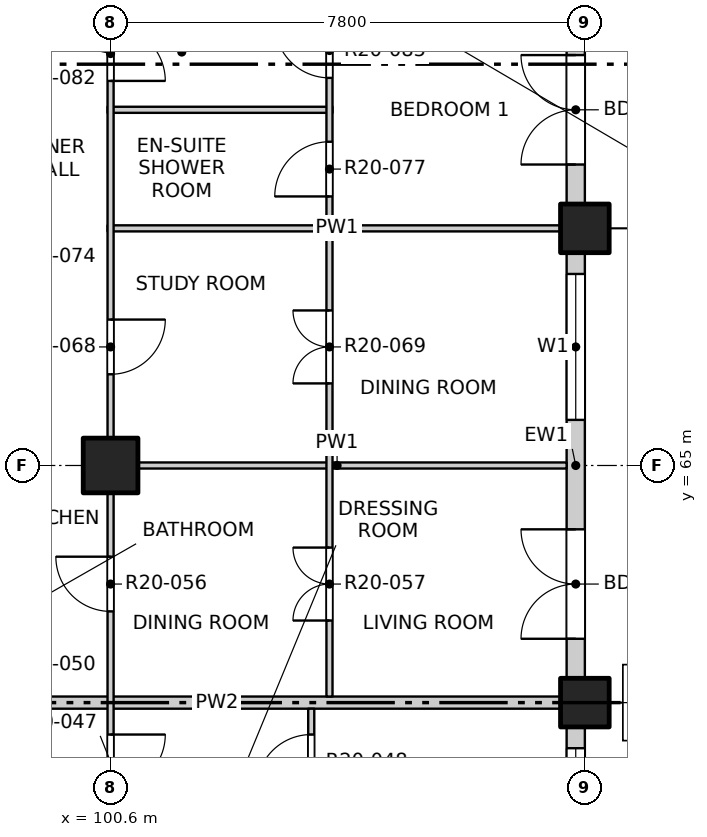
"""IFC4 building model, lengths in metres.
Left out: names, types, materials, properties, quantities, classifications, styles, units other than length and angle.
Written with IfcOpenShell. Run it as: python <this file> out.ifc"""

import sys

from ifc_helpers import new_model, si_unit, direction, frame, frame_2d, origin, origin_2d, place, context, subcontext, project, spatial, rectangle, extrude, element, fill, save


model = new_model("IFC4")
c1 = context("Model", 3, precision=1e-05, world=origin(), true_north=direction((0.0, 1.0)))
c2 = subcontext(c1, "Body", "Model", "MODEL_VIEW")
j1 = project(units=[si_unit("LENGTHUNIT", "METRE"), si_unit("PLANEANGLEUNIT", "RADIAN")], contexts=[c1])
p1 = place(None, origin())
s1 = spatial("IfcSite", under=j1, at=p1, CompositionType="ELEMENT")
p2 = place(p1, origin())
s2 = spatial("IfcBuilding", under=s1, at=p2, CompositionType="ELEMENT")
p3 = place(p2, frame((0.0, 0.0, 204.1)))
s3 = spatial("IfcBuildingStorey", under=s2, at=p3, CompositionType="ELEMENT", Elevation=204.1)
for number, where, z_axis, x_axis in (
    (1, (108.4, 61.1, -0.25), (0.0, 0.0, 1.0), (1.0, 0.0, 0.0)),
    (2, (108.4, 68.9, -0.25), (0.0, 0.0, 1.0), (1.0, 0.0, 0.0)),
):
    element("IfcColumn", number, at=place(p3, frame(where, z_axis=z_axis, x_axis=x_axis)), inside=s3, PredefinedType="COLUMN", context=c2, shape_type="SweptSolid", body=[
        extrude(rectangle(XDim=0.8, YDim=0.8, at=origin_2d()), origin(), (0.0, 0.0, 1.0), 3.4),
    ])
p4 = place(p3, frame((100.6, 65.0, -0.25), z_axis=(0.0, 0.0, 1.0), x_axis=(1.0, 0.0, 0.0)))
e3 = element("IfcColumn", 3, at=p4, inside=s3, PredefinedType="COLUMN", context=c2, shape_type="SweptSolid", body=[
    extrude(rectangle(XDim=0.9, YDim=0.9, at=origin_2d()), origin(), (0.0, 0.0, 1.0), 3.4),
])
p5 = place(p3, frame((108.25, 53.7, 0.0), z_axis=(0.0, 0.0, 1.0), x_axis=(0.0, 1.0, 0.0)))
e4 = element("IfcWall", 4, at=p5, inside=s3, PredefinedType="SOLIDWALL", context=c2, shape_type="SweptSolid", body=[
    extrude(rectangle(XDim=7.0, YDim=0.3, at=frame_2d((3.5, 0.0))), origin(), (0.0, 0.0, 1.0), 2.7),
])
p6 = place(p5, frame((0.65, 0.0, 0.0)))
e5 = element("IfcOpeningElement", 5, at=p6, cuts=e4, PredefinedType="OPENING", context=c2, shape_type="SweptSolid", body=[
    extrude(rectangle(XDim=1.8, YDim=2.4, at=frame_2d((0.9, 1.2))), frame((0.0, 0.16, 0.0), z_axis=(0.0, -1.0, 0.0), x_axis=(1.0, 0.0, 0.0)), (0.0, 0.0, 1.0), 0.32),
])
p7 = place(p5, frame((4.25, 0.0, 0.9)))
e6 = element("IfcOpeningElement", 6, at=p7, cuts=e4, PredefinedType="OPENING", context=c2, shape_type="SweptSolid", body=[
    extrude(rectangle(XDim=2.4, YDim=1.8, at=frame_2d((1.2, 0.9))), frame((0.0, 0.16, 0.0), z_axis=(0.0, -1.0, 0.0), x_axis=(1.0, 0.0, 0.0)), (0.0, 0.0, 1.0), 0.32),
])
p8 = place(p3, frame((108.25, 61.5, 0.0), z_axis=(0.0, 0.0, 1.0), x_axis=(0.0, 1.0, 0.0)))
e7 = element("IfcWall", 7, at=p8, inside=s3, PredefinedType="SOLIDWALL", context=c2, shape_type="SweptSolid", body=[
    extrude(rectangle(XDim=7.0, YDim=0.3, at=frame_2d((3.5, 0.0))), origin(), (0.0, 0.0, 1.0), 2.7),
])
p9 = place(p8, frame((0.65, 0.0, 0.0)))
e8 = element("IfcOpeningElement", 8, at=p9, cuts=e7, PredefinedType="OPENING", context=c2, shape_type="SweptSolid", body=[
    extrude(rectangle(XDim=1.8, YDim=2.4, at=frame_2d((0.9, 1.2))), frame((0.0, 0.16, 0.0), z_axis=(0.0, -1.0, 0.0), x_axis=(1.0, 0.0, 0.0)), (0.0, 0.0, 1.0), 0.32),
])
p10 = place(p8, frame((4.25, 0.0, 0.9)))
e9 = element("IfcOpeningElement", 9, at=p10, cuts=e7, PredefinedType="OPENING", context=c2, shape_type="SweptSolid", body=[
    extrude(rectangle(XDim=2.4, YDim=1.8, at=frame_2d((1.2, 0.9))), frame((0.0, 0.16, 0.0), z_axis=(0.0, -1.0, 0.0), x_axis=(1.0, 0.0, 0.0)), (0.0, 0.0, 1.0), 0.32),
])
p11 = place(p3, frame((108.25, 69.3, 0.0), z_axis=(0.0, 0.0, 1.0), x_axis=(0.0, 1.0, 0.0)))
e10 = element("IfcWall", 10, at=p11, inside=s3, PredefinedType="SOLIDWALL", context=c2, shape_type="SweptSolid", body=[
    extrude(rectangle(XDim=7.0, YDim=0.3, at=frame_2d((3.5, 0.0))), origin(), (0.0, 0.0, 1.0), 2.7),
])
p12 = place(p11, frame((0.65, 0.0, 0.0)))
e11 = element("IfcOpeningElement", 11, at=p12, cuts=e10, PredefinedType="OPENING", context=c2, shape_type="SweptSolid", body=[
    extrude(rectangle(XDim=1.8, YDim=2.4, at=frame_2d((0.9, 1.2))), frame((0.0, 0.16, 0.0), z_axis=(0.0, -1.0, 0.0), x_axis=(1.0, 0.0, 0.0)), (0.0, 0.0, 1.0), 0.32),
])
p13 = place(p11, frame((4.25, 0.0, 0.9)))
e12 = element("IfcOpeningElement", 12, at=p13, cuts=e10, PredefinedType="OPENING", context=c2, shape_type="SweptSolid", body=[
    extrude(rectangle(XDim=2.4, YDim=1.8, at=frame_2d((1.2, 0.9))), frame((0.0, 0.16, 0.0), z_axis=(0.0, -1.0, 0.0), x_axis=(1.0, 0.0, 0.0)), (0.0, 0.0, 1.0), 0.32),
])
p14 = place(p3, frame((96.6, 61.1, 0.0), z_axis=(0.0, 0.0, 1.0), x_axis=(1.0, 0.0, 0.0)))
e13 = element("IfcWall", 13, at=p14, inside=s3, PredefinedType="PARTITIONING", context=c2, shape_type="SweptSolid", body=[
    extrude(rectangle(XDim=11.5, YDim=0.2, at=frame_2d((5.75, 0.0))), origin(), (0.0, 0.0, 1.0), 2.55),
])
p15 = place(p3, frame((100.55, 65.0, 0.0), z_axis=(0.0, 0.0, 1.0), x_axis=(1.0, 0.0, 0.0)))
e14 = element("IfcWall", 14, at=p15, inside=s3, PredefinedType="PARTITIONING", context=c2, shape_type="SweptSolid", body=[
    extrude(rectangle(XDim=7.55, YDim=0.1, at=frame_2d((3.775, 0.0))), origin(), (0.0, 0.0, 1.0), 3.15),
])
p16 = place(p3, frame((100.55, 68.9, 0.0), z_axis=(0.0, 0.0, 1.0), x_axis=(1.0, 0.0, 0.0)))
e15 = element("IfcWall", 15, at=p16, inside=s3, PredefinedType="PARTITIONING", context=c2, shape_type="SweptSolid", body=[
    extrude(rectangle(XDim=7.55, YDim=0.1, at=frame_2d((3.775, 0.0))), origin(), (0.0, 0.0, 1.0), 2.55),
])
p17 = place(p3, frame((100.55, 70.85, 0.0), z_axis=(0.0, 0.0, 1.0), x_axis=(1.0, 0.0, 0.0)))
e16 = element("IfcWall", 16, at=p17, inside=s3, PredefinedType="PARTITIONING", context=c2, shape_type="SweptSolid", body=[
    extrude(rectangle(XDim=3.7, YDim=0.1, at=frame_2d((1.85, 0.0))), origin(), (0.0, 0.0, 1.0), 3.15),
])
p18 = place(p3, frame((100.6, 41.9, 0.0), z_axis=(0.0, 0.0, 1.0), x_axis=(0.0, 1.0, 0.0)))
e17 = element("IfcWall", 17, at=p18, inside=s3, PredefinedType="PARTITIONING", context=c2, shape_type="SweptSolid", body=[
    extrude(rectangle(XDim=46.2, YDim=0.1, at=frame_2d((23.1, 0.0))), origin(), (0.0, 0.0, 1.0), 3.15),
])
p19 = place(p18, frame((1.2, 0.0, 0.0)))
e18 = element("IfcOpeningElement", 18, at=p19, cuts=e17, PredefinedType="OPENING", context=c2, shape_type="SweptSolid", body=[
    extrude(rectangle(XDim=0.9, YDim=2.1, at=frame_2d((0.45, 1.05))), frame((0.0, 0.06, 0.0), z_axis=(0.0, -1.0, 0.0), x_axis=(1.0, 0.0, 0.0)), (0.0, 0.0, 1.0), 0.12),
])
p20 = place(p18, frame((6.025, 0.0, 0.0)))
e19 = element("IfcOpeningElement", 19, at=p20, cuts=e17, PredefinedType="OPENING", context=c2, shape_type="SweptSolid", body=[
    extrude(rectangle(XDim=0.9, YDim=2.1, at=frame_2d((0.45, 1.05))), frame((0.0, 0.06, 0.0), z_axis=(0.0, -1.0, 0.0), x_axis=(1.0, 0.0, 0.0)), (0.0, 0.0, 1.0), 0.12),
])
p21 = place(p18, frame((9.0, 0.0, 0.0)))
e20 = element("IfcOpeningElement", 20, at=p21, cuts=e17, PredefinedType="OPENING", context=c2, shape_type="SweptSolid", body=[
    extrude(rectangle(XDim=0.9, YDim=2.1, at=frame_2d((0.45, 1.05))), frame((0.0, 0.06, 0.0), z_axis=(0.0, -1.0, 0.0), x_axis=(1.0, 0.0, 0.0)), (0.0, 0.0, 1.0), 0.12),
])
p22 = place(p18, frame((13.85, 0.0, 0.0)))
e21 = element("IfcOpeningElement", 21, at=p22, cuts=e17, PredefinedType="OPENING", context=c2, shape_type="SweptSolid", body=[
    extrude(rectangle(XDim=0.9, YDim=2.1, at=frame_2d((0.45, 1.05))), frame((0.0, 0.06, 0.0), z_axis=(0.0, -1.0, 0.0), x_axis=(1.0, 0.0, 0.0)), (0.0, 0.0, 1.0), 0.12),
])
p23 = place(p18, frame((17.775, 0.0, 0.0)))
e22 = element("IfcOpeningElement", 22, at=p23, cuts=e17, PredefinedType="OPENING", context=c2, shape_type="SweptSolid", body=[
    extrude(rectangle(XDim=0.9, YDim=2.1, at=frame_2d((0.45, 1.05))), frame((0.0, 0.06, 0.0), z_axis=(0.0, -1.0, 0.0), x_axis=(1.0, 0.0, 0.0)), (0.0, 0.0, 1.0), 0.12),
])
p24 = place(p18, frame((20.7, 0.0, 0.0)))
e23 = element("IfcOpeningElement", 23, at=p24, cuts=e17, PredefinedType="OPENING", context=c2, shape_type="SweptSolid", body=[
    extrude(rectangle(XDim=0.9, YDim=2.1, at=frame_2d((0.45, 1.05))), frame((0.0, 0.06, 0.0), z_axis=(0.0, -1.0, 0.0), x_axis=(1.0, 0.0, 0.0)), (0.0, 0.0, 1.0), 0.12),
])
p25 = place(p18, frame((24.6, 0.0, 0.0)))
e24 = element("IfcOpeningElement", 24, at=p25, cuts=e17, PredefinedType="OPENING", context=c2, shape_type="SweptSolid", body=[
    extrude(rectangle(XDim=0.9, YDim=2.1, at=frame_2d((0.45, 1.05))), frame((0.0, 0.06, 0.0), z_axis=(0.0, -1.0, 0.0), x_axis=(1.0, 0.0, 0.0)), (0.0, 0.0, 1.0), 0.12),
])
p26 = place(p18, frame((29.425, 0.0, 0.0)))
e25 = element("IfcOpeningElement", 25, at=p26, cuts=e17, PredefinedType="OPENING", context=c2, shape_type="SweptSolid", body=[
    extrude(rectangle(XDim=0.9, YDim=2.1, at=frame_2d((0.45, 1.05))), frame((0.0, 0.06, 0.0), z_axis=(0.0, -1.0, 0.0), x_axis=(1.0, 0.0, 0.0)), (0.0, 0.0, 1.0), 0.12),
])
p27 = place(p18, frame((33.375, 0.0, 0.0)))
e26 = element("IfcOpeningElement", 26, at=p27, cuts=e17, PredefinedType="OPENING", context=c2, shape_type="SweptSolid", body=[
    extrude(rectangle(XDim=0.9, YDim=2.1, at=frame_2d((0.45, 1.05))), frame((0.0, 0.06, 0.0), z_axis=(0.0, -1.0, 0.0), x_axis=(1.0, 0.0, 0.0)), (0.0, 0.0, 1.0), 0.12),
])
p28 = place(p18, frame((36.3, 0.0, 0.0)))
e27 = element("IfcOpeningElement", 27, at=p28, cuts=e17, PredefinedType="OPENING", context=c2, shape_type="SweptSolid", body=[
    extrude(rectangle(XDim=0.9, YDim=2.1, at=frame_2d((0.45, 1.05))), frame((0.0, 0.06, 0.0), z_axis=(0.0, -1.0, 0.0), x_axis=(1.0, 0.0, 0.0)), (0.0, 0.0, 1.0), 0.12),
])
p29 = place(p18, frame((41.175, 0.0, 0.0)))
e28 = element("IfcOpeningElement", 28, at=p29, cuts=e17, PredefinedType="OPENING", context=c2, shape_type="SweptSolid", body=[
    extrude(rectangle(XDim=0.9, YDim=2.1, at=frame_2d((0.45, 1.05))), frame((0.0, 0.06, 0.0), z_axis=(0.0, -1.0, 0.0), x_axis=(1.0, 0.0, 0.0)), (0.0, 0.0, 1.0), 0.12),
])
p30 = place(p18, frame((44.1, 0.0, 0.0)))
e29 = element("IfcOpeningElement", 29, at=p30, cuts=e17, PredefinedType="OPENING", context=c2, shape_type="SweptSolid", body=[
    extrude(rectangle(XDim=0.9, YDim=2.1, at=frame_2d((0.45, 1.05))), frame((0.0, 0.06, 0.0), z_axis=(0.0, -1.0, 0.0), x_axis=(1.0, 0.0, 0.0)), (0.0, 0.0, 1.0), 0.12),
])
p31 = place(p3, frame((103.9, 41.9, 0.0), z_axis=(0.0, 0.0, 1.0), x_axis=(0.0, 1.0, 0.0)))
e30 = element("IfcWall", 30, at=p31, inside=s3, PredefinedType="PARTITIONING", context=c2, shape_type="SweptSolid", body=[
    extrude(rectangle(XDim=19.1, YDim=0.1, at=frame_2d((9.55, 0.0))), origin(), (0.0, 0.0, 1.0), 3.15),
])
p32 = place(p31, frame((1.05, 0.0, 0.0)))
e31 = element("IfcOpeningElement", 31, at=p32, cuts=e30, PredefinedType="OPENING", context=c2, shape_type="SweptSolid", body=[
    extrude(rectangle(XDim=1.2, YDim=2.1, at=frame_2d((0.6, 1.05))), frame((0.0, 0.06, 0.0), z_axis=(0.0, -1.0, 0.0), x_axis=(1.0, 0.0, 0.0)), (0.0, 0.0, 1.0), 0.12),
])
p33 = place(p31, frame((4.125, 0.0, 0.0)))
e32 = element("IfcOpeningElement", 32, at=p33, cuts=e30, PredefinedType="OPENING", context=c2, shape_type="SweptSolid", body=[
    extrude(rectangle(XDim=0.9, YDim=2.1, at=frame_2d((0.45, 1.05))), frame((0.0, 0.06, 0.0), z_axis=(0.0, -1.0, 0.0), x_axis=(1.0, 0.0, 0.0)), (0.0, 0.0, 1.0), 0.12),
])
p34 = place(p31, frame((6.075, 0.0, 0.0)))
e33 = element("IfcOpeningElement", 33, at=p34, cuts=e30, PredefinedType="OPENING", context=c2, shape_type="SweptSolid", body=[
    extrude(rectangle(XDim=0.9, YDim=2.1, at=frame_2d((0.45, 1.05))), frame((0.0, 0.06, 0.0), z_axis=(0.0, -1.0, 0.0), x_axis=(1.0, 0.0, 0.0)), (0.0, 0.0, 1.0), 0.12),
])
p35 = place(p31, frame((8.85, 0.0, 0.0)))
e34 = element("IfcOpeningElement", 34, at=p35, cuts=e30, PredefinedType="OPENING", context=c2, shape_type="SweptSolid", body=[
    extrude(rectangle(XDim=1.2, YDim=2.1, at=frame_2d((0.6, 1.05))), frame((0.0, 0.06, 0.0), z_axis=(0.0, -1.0, 0.0), x_axis=(1.0, 0.0, 0.0)), (0.0, 0.0, 1.0), 0.12),
])
p36 = place(p31, frame((11.925, 0.0, 0.0)))
e35 = element("IfcOpeningElement", 35, at=p36, cuts=e30, PredefinedType="OPENING", context=c2, shape_type="SweptSolid", body=[
    extrude(rectangle(XDim=0.9, YDim=2.1, at=frame_2d((0.45, 1.05))), frame((0.0, 0.06, 0.0), z_axis=(0.0, -1.0, 0.0), x_axis=(1.0, 0.0, 0.0)), (0.0, 0.0, 1.0), 0.12),
])
p37 = place(p31, frame((13.875, 0.0, 0.0)))
e36 = element("IfcOpeningElement", 36, at=p37, cuts=e30, PredefinedType="OPENING", context=c2, shape_type="SweptSolid", body=[
    extrude(rectangle(XDim=0.9, YDim=2.1, at=frame_2d((0.45, 1.05))), frame((0.0, 0.06, 0.0), z_axis=(0.0, -1.0, 0.0), x_axis=(1.0, 0.0, 0.0)), (0.0, 0.0, 1.0), 0.12),
])
p38 = place(p31, frame((15.825, 0.0, 0.0)))
e37 = element("IfcOpeningElement", 37, at=p38, cuts=e30, PredefinedType="OPENING", context=c2, shape_type="SweptSolid", body=[
    extrude(rectangle(XDim=0.9, YDim=2.1, at=frame_2d((0.45, 1.05))), frame((0.0, 0.06, 0.0), z_axis=(0.0, -1.0, 0.0), x_axis=(1.0, 0.0, 0.0)), (0.0, 0.0, 1.0), 0.12),
])
p39 = place(p31, frame((17.775, 0.0, 0.0)))
e38 = element("IfcOpeningElement", 38, at=p39, cuts=e30, PredefinedType="OPENING", context=c2, shape_type="SweptSolid", body=[
    extrude(rectangle(XDim=0.9, YDim=2.1, at=frame_2d((0.45, 1.05))), frame((0.0, 0.06, 0.0), z_axis=(0.0, -1.0, 0.0), x_axis=(1.0, 0.0, 0.0)), (0.0, 0.0, 1.0), 0.12),
])
p40 = place(p3, frame((104.2, 61.2, 0.0), z_axis=(0.0, 0.0, 1.0), x_axis=(0.0, 1.0, 0.0)))
e39 = element("IfcWall", 39, at=p40, inside=s3, PredefinedType="PARTITIONING", context=c2, shape_type="SweptSolid", body=[
    extrude(rectangle(XDim=26.9, YDim=0.1, at=frame_2d((13.45, 0.0))), origin(), (0.0, 0.0, 1.0), 3.15),
])
p41 = place(p40, frame((1.25, 0.0, 0.0)))
e40 = element("IfcOpeningElement", 40, at=p41, cuts=e39, PredefinedType="OPENING", context=c2, shape_type="SweptSolid", body=[
    extrude(rectangle(XDim=1.2, YDim=2.1, at=frame_2d((0.6, 1.05))), frame((0.0, 0.06, 0.0), z_axis=(0.0, -1.0, 0.0), x_axis=(1.0, 0.0, 0.0)), (0.0, 0.0, 1.0), 0.12),
])
p42 = place(p40, frame((5.15, 0.0, 0.0)))
e41 = element("IfcOpeningElement", 41, at=p42, cuts=e39, PredefinedType="OPENING", context=c2, shape_type="SweptSolid", body=[
    extrude(rectangle(XDim=1.2, YDim=2.1, at=frame_2d((0.6, 1.05))), frame((0.0, 0.06, 0.0), z_axis=(0.0, -1.0, 0.0), x_axis=(1.0, 0.0, 0.0)), (0.0, 0.0, 1.0), 0.12),
])
p43 = place(p40, frame((8.225, 0.0, 0.0)))
e42 = element("IfcOpeningElement", 42, at=p43, cuts=e39, PredefinedType="OPENING", context=c2, shape_type="SweptSolid", body=[
    extrude(rectangle(XDim=0.9, YDim=2.1, at=frame_2d((0.45, 1.05))), frame((0.0, 0.06, 0.0), z_axis=(0.0, -1.0, 0.0), x_axis=(1.0, 0.0, 0.0)), (0.0, 0.0, 1.0), 0.12),
])
p44 = place(p40, frame((10.175, 0.0, 0.0)))
e43 = element("IfcOpeningElement", 43, at=p44, cuts=e39, PredefinedType="OPENING", context=c2, shape_type="SweptSolid", body=[
    extrude(rectangle(XDim=0.9, YDim=2.1, at=frame_2d((0.45, 1.05))), frame((0.0, 0.06, 0.0), z_axis=(0.0, -1.0, 0.0), x_axis=(1.0, 0.0, 0.0)), (0.0, 0.0, 1.0), 0.12),
])
p45 = place(p40, frame((12.125, 0.0, 0.0)))
e44 = element("IfcOpeningElement", 44, at=p45, cuts=e39, PredefinedType="OPENING", context=c2, shape_type="SweptSolid", body=[
    extrude(rectangle(XDim=0.9, YDim=2.1, at=frame_2d((0.45, 1.05))), frame((0.0, 0.06, 0.0), z_axis=(0.0, -1.0, 0.0), x_axis=(1.0, 0.0, 0.0)), (0.0, 0.0, 1.0), 0.12),
])
p46 = place(p40, frame((14.075, 0.0, 0.0)))
e45 = element("IfcOpeningElement", 45, at=p46, cuts=e39, PredefinedType="OPENING", context=c2, shape_type="SweptSolid", body=[
    extrude(rectangle(XDim=0.9, YDim=2.1, at=frame_2d((0.45, 1.05))), frame((0.0, 0.06, 0.0), z_axis=(0.0, -1.0, 0.0), x_axis=(1.0, 0.0, 0.0)), (0.0, 0.0, 1.0), 0.12),
])
p47 = place(p40, frame((16.85, 0.0, 0.0)))
e46 = element("IfcOpeningElement", 46, at=p47, cuts=e39, PredefinedType="OPENING", context=c2, shape_type="SweptSolid", body=[
    extrude(rectangle(XDim=1.2, YDim=2.1, at=frame_2d((0.6, 1.05))), frame((0.0, 0.06, 0.0), z_axis=(0.0, -1.0, 0.0), x_axis=(1.0, 0.0, 0.0)), (0.0, 0.0, 1.0), 0.12),
])
p48 = place(p40, frame((19.925, 0.0, 0.0)))
e47 = element("IfcOpeningElement", 47, at=p48, cuts=e39, PredefinedType="OPENING", context=c2, shape_type="SweptSolid", body=[
    extrude(rectangle(XDim=0.9, YDim=2.1, at=frame_2d((0.45, 1.05))), frame((0.0, 0.06, 0.0), z_axis=(0.0, -1.0, 0.0), x_axis=(1.0, 0.0, 0.0)), (0.0, 0.0, 1.0), 0.12),
])
p49 = place(p40, frame((21.875, 0.0, 0.0)))
e48 = element("IfcOpeningElement", 48, at=p49, cuts=e39, PredefinedType="OPENING", context=c2, shape_type="SweptSolid", body=[
    extrude(rectangle(XDim=0.9, YDim=2.1, at=frame_2d((0.45, 1.05))), frame((0.0, 0.06, 0.0), z_axis=(0.0, -1.0, 0.0), x_axis=(1.0, 0.0, 0.0)), (0.0, 0.0, 1.0), 0.12),
])
p50 = place(p40, frame((24.65, 0.0, 0.0)))
e49 = element("IfcOpeningElement", 49, at=p50, cuts=e39, PredefinedType="OPENING", context=c2, shape_type="SweptSolid", body=[
    extrude(rectangle(XDim=1.2, YDim=2.1, at=frame_2d((0.6, 1.05))), frame((0.0, 0.06, 0.0), z_axis=(0.0, -1.0, 0.0), x_axis=(1.0, 0.0, 0.0)), (0.0, 0.0, 1.0), 0.12),
])
p51 = place(p7, origin())
e50 = element("IfcWindow", 50, at=p51, inside=s3, PartitioningType="DOUBLE_PANEL_VERTICAL", PredefinedType="WINDOW", context=c2, shape_type="SweptSolid", body=[
    extrude(rectangle(XDim=2.4, YDim=1.8, at=frame_2d((1.2, 0.9))), frame((0.0, 0.03, 0.0), z_axis=(0.0, -1.0, 0.0), x_axis=(1.0, 0.0, 0.0)), (0.0, 0.0, 1.0), 0.06),
])
fill(e6, e50)
p52 = place(p9, origin())
e51 = element("IfcDoor", 51, at=p52, inside=s3, OperationType="DOUBLE_DOOR_SINGLE_SWING", PredefinedType="DOOR", context=c2, shape_type="SweptSolid", body=[
    extrude(rectangle(XDim=1.8, YDim=2.4, at=frame_2d((0.9, 1.2))), frame((0.0, 0.025, 0.0), z_axis=(0.0, -1.0, 0.0), x_axis=(1.0, 0.0, 0.0)), (0.0, 0.0, 1.0), 0.05),
])
fill(e8, e51)
p53 = place(p10, origin())
e52 = element("IfcWindow", 52, at=p53, inside=s3, PartitioningType="DOUBLE_PANEL_VERTICAL", PredefinedType="WINDOW", context=c2, shape_type="SweptSolid", body=[
    extrude(rectangle(XDim=2.4, YDim=1.8, at=frame_2d((1.2, 0.9))), frame((0.0, 0.03, 0.0), z_axis=(0.0, -1.0, 0.0), x_axis=(1.0, 0.0, 0.0)), (0.0, 0.0, 1.0), 0.06),
])
fill(e9, e52)
p54 = place(p12, origin())
e53 = element("IfcDoor", 53, at=p54, inside=s3, OperationType="DOUBLE_DOOR_SINGLE_SWING", PredefinedType="DOOR", context=c2, shape_type="SweptSolid", body=[
    extrude(rectangle(XDim=1.8, YDim=2.4, at=frame_2d((0.9, 1.2))), frame((0.0, 0.025, 0.0), z_axis=(0.0, -1.0, 0.0), x_axis=(1.0, 0.0, 0.0)), (0.0, 0.0, 1.0), 0.05),
])
fill(e11, e53)
p55 = place(p23, origin())
e54 = element("IfcDoor", 54, at=p55, inside=s3, OperationType="SINGLE_SWING_LEFT", PredefinedType="DOOR", context=c2, shape_type="SweptSolid", body=[
    extrude(rectangle(XDim=0.9, YDim=2.1, at=frame_2d((0.45, 1.05))), frame((0.0, 0.025, 0.0), z_axis=(0.0, -1.0, 0.0), x_axis=(1.0, 0.0, 0.0)), (0.0, 0.0, 1.0), 0.05),
])
fill(e22, e54)
p56 = place(p39, origin())
e55 = element("IfcDoor", 55, at=p56, inside=s3, OperationType="SINGLE_SWING_LEFT", PredefinedType="DOOR", context=c2, shape_type="SweptSolid", body=[
    extrude(rectangle(XDim=0.9, YDim=2.1, at=frame_2d((0.45, 1.05))), frame((0.0, 0.025, 0.0), z_axis=(0.0, -1.0, 0.0), x_axis=(1.0, 0.0, 0.0)), (0.0, 0.0, 1.0), 0.05),
])
fill(e38, e55)
p57 = place(p24, origin())
e56 = element("IfcDoor", 56, at=p57, inside=s3, OperationType="SINGLE_SWING_RIGHT", PredefinedType="DOOR", context=c2, shape_type="SweptSolid", body=[
    extrude(rectangle(XDim=0.9, YDim=2.1, at=frame_2d((0.45, 1.05))), frame((0.0, 0.025, 0.0), z_axis=(0.0, -1.0, 0.0), x_axis=(1.0, 0.0, 0.0)), (0.0, 0.0, 1.0), 0.05),
])
fill(e23, e56)
p58 = place(p41, origin())
e57 = element("IfcDoor", 57, at=p58, inside=s3, OperationType="DOUBLE_DOOR_SINGLE_SWING", PredefinedType="DOOR", context=c2, shape_type="SweptSolid", body=[
    extrude(rectangle(XDim=1.2, YDim=2.1, at=frame_2d((0.6, 1.05))), frame((0.0, 0.025, 0.0), z_axis=(0.0, -1.0, 0.0), x_axis=(1.0, 0.0, 0.0)), (0.0, 0.0, 1.0), 0.05),
])
fill(e40, e57)
p59 = place(p25, origin())
e58 = element("IfcDoor", 58, at=p59, inside=s3, OperationType="SINGLE_SWING_LEFT", PredefinedType="DOOR", context=c2, shape_type="SweptSolid", body=[
    extrude(rectangle(XDim=0.9, YDim=2.1, at=frame_2d((0.45, 1.05))), frame((0.0, 0.025, 0.0), z_axis=(0.0, -1.0, 0.0), x_axis=(1.0, 0.0, 0.0)), (0.0, 0.0, 1.0), 0.05),
])
fill(e24, e58)
p60 = place(p42, origin())
e59 = element("IfcDoor", 59, at=p60, inside=s3, OperationType="DOUBLE_DOOR_SINGLE_SWING", PredefinedType="DOOR", context=c2, shape_type="SweptSolid", body=[
    extrude(rectangle(XDim=1.2, YDim=2.1, at=frame_2d((0.6, 1.05))), frame((0.0, 0.025, 0.0), z_axis=(0.0, -1.0, 0.0), x_axis=(1.0, 0.0, 0.0)), (0.0, 0.0, 1.0), 0.05),
])
fill(e41, e59)
p61 = place(p43, origin())
e60 = element("IfcDoor", 60, at=p61, inside=s3, OperationType="SINGLE_SWING_LEFT", PredefinedType="DOOR", context=c2, shape_type="SweptSolid", body=[
    extrude(rectangle(XDim=0.9, YDim=2.1, at=frame_2d((0.45, 1.05))), frame((0.0, 0.025, 0.0), z_axis=(0.0, -1.0, 0.0), x_axis=(1.0, 0.0, 0.0)), (0.0, 0.0, 1.0), 0.05),
])
fill(e42, e60)
p62 = place(p26, origin())
e61 = element("IfcDoor", 61, at=p62, inside=s3, OperationType="SINGLE_SWING_RIGHT", PredefinedType="DOOR", context=c2, shape_type="SweptSolid", body=[
    extrude(rectangle(XDim=0.9, YDim=2.1, at=frame_2d((0.45, 1.05))), frame((0.0, 0.025, 0.0), z_axis=(0.0, -1.0, 0.0), x_axis=(1.0, 0.0, 0.0)), (0.0, 0.0, 1.0), 0.05),
])
fill(e25, e61)
p63 = place(p44, origin())
e62 = element("IfcDoor", 62, at=p63, inside=s3, OperationType="SINGLE_SWING_RIGHT", PredefinedType="DOOR", context=c2, shape_type="SweptSolid", body=[
    extrude(rectangle(XDim=0.9, YDim=2.1, at=frame_2d((0.45, 1.05))), frame((0.0, 0.025, 0.0), z_axis=(0.0, -1.0, 0.0), x_axis=(1.0, 0.0, 0.0)), (0.0, 0.0, 1.0), 0.05),
])
fill(e43, e62)
save(model, sys.argv[1])
